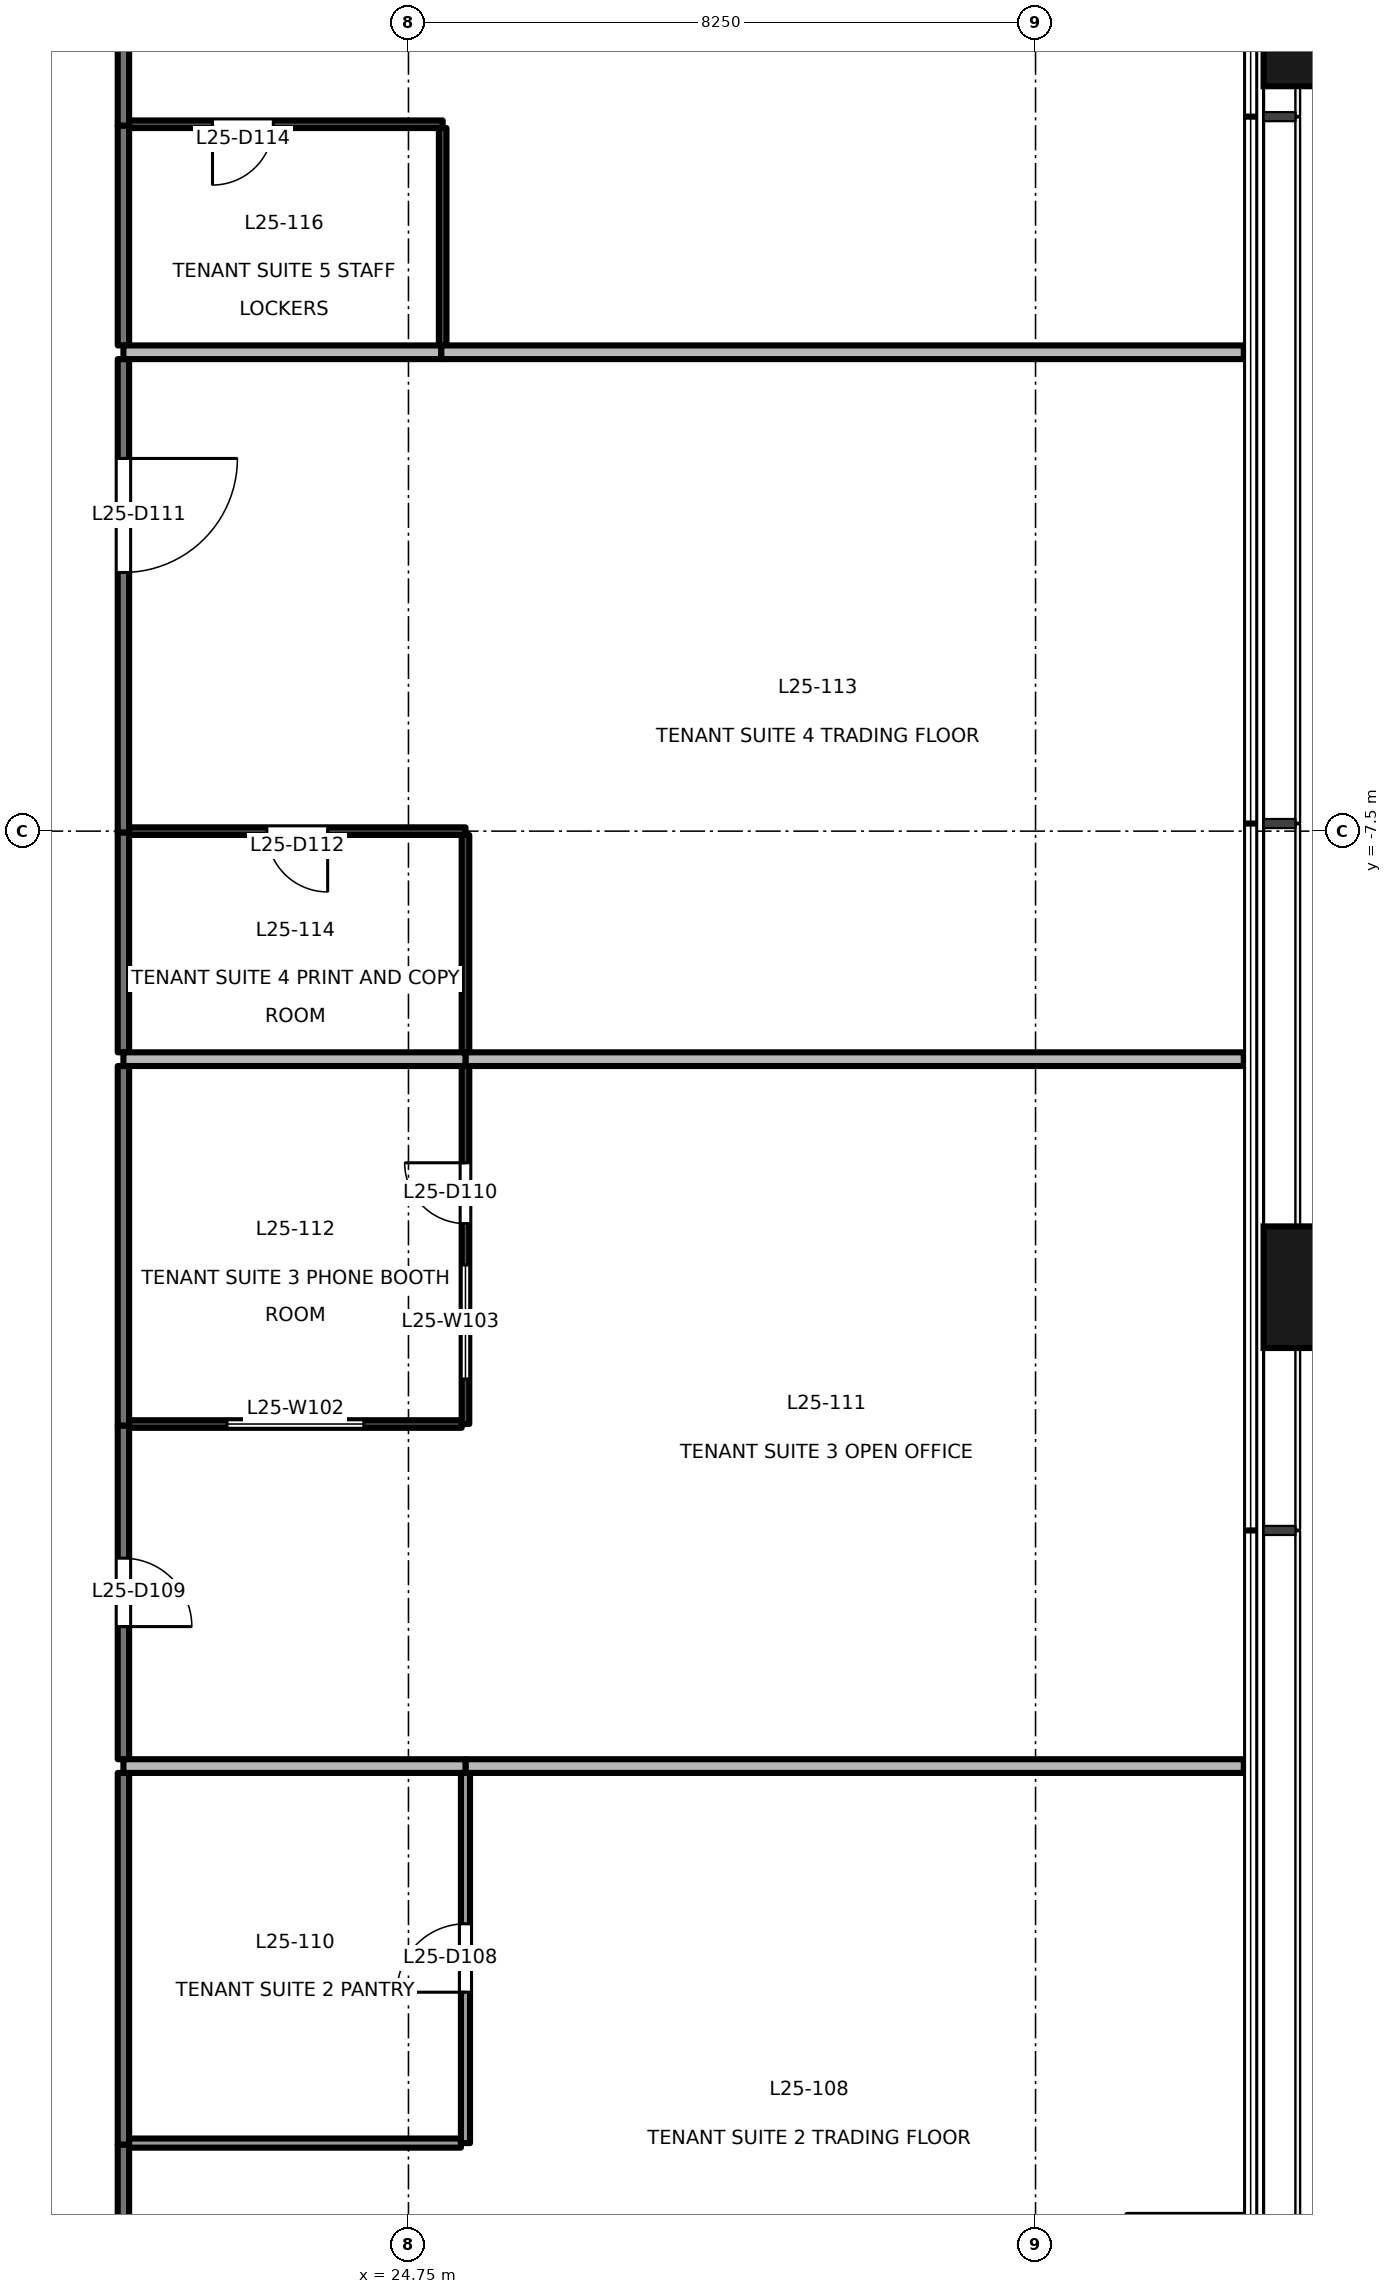
"""IFC4 building model, lengths in metres.
Left out: names, types, materials, properties, quantities, classifications, styles, units other than length and angle.
Written with IfcOpenShell. Run it as: python <this file> out.ifc"""

import sys

from ifc_helpers import new_model, si_unit, direction, frame, frame_2d, origin, origin_2d, place, context, subcontext, project, spatial, rectangle, extrude, element, fill, save


model = new_model("IFC4")
c1 = context("Model", 3, precision=1e-05, world=origin(), true_north=direction((0.0, 1.0)))
c2 = subcontext(c1, "Body", "Model", "MODEL_VIEW")
j1 = project(units=[si_unit("LENGTHUNIT", "METRE"), si_unit("PLANEANGLEUNIT", "RADIAN")], contexts=[c1])
p1 = place(None, origin())
s1 = spatial("IfcSite", under=j1, at=p1, CompositionType="ELEMENT")
p2 = place(p1, origin())
s2 = spatial("IfcBuilding", under=s1, at=p2, CompositionType="ELEMENT")
p3 = place(p2, frame((0.0, 0.0, 111.7)))
s3 = spatial("IfcBuildingStorey", under=s2, at=p3, CompositionType="ELEMENT", Elevation=111.7)
for number, where, z_axis, x_axis in (
    (1, (36.9, -13.5, -0.2), (0.0, 0.0, 1.0), (0.0, 1.0, 0.0)),
    (2, (36.9, 3.1, -0.2), (0.0, 0.0, 1.0), (0.0, 1.0, 0.0)),
):
    element("IfcColumn", number, at=place(p3, frame(where, z_axis=z_axis, x_axis=x_axis)), inside=s3, PredefinedType="COLUMN", context=c2, shape_type="SweptSolid", body=[
        extrude(rectangle(XDim=1.6, YDim=1.8, at=origin_2d()), origin(), (0.0, 0.0, 1.0), 4.0),
    ])
p4 = place(p3, frame((21.0, -24.78, 0.0), z_axis=(0.0, 0.0, 1.0), x_axis=(0.0, -1.0, 0.0)))
e3 = element("IfcWall", 3, at=p4, inside=s3, PredefinedType="PARTITIONING", context=c2, shape_type="SweptSolid", body=[
    extrude(rectangle(XDim=3.9, YDim=0.15, at=frame_2d((1.95, 0.0))), origin(), (0.0, 0.0, 1.0), 3.8),
])
p5 = place(p4, frame((1.675, 0.0, 0.0)))
e4 = element("IfcOpeningElement", 4, at=p5, cuts=e3, PredefinedType="OPENING", context=c2, shape_type="SweptSolid", body=[
    extrude(rectangle(XDim=1.5, YDim=2.1, at=frame_2d((0.75, 1.05))), frame((0.0, 0.085, 0.0), z_axis=(0.0, -1.0, 0.0), x_axis=(1.0, 0.0, 0.0)), (0.0, 0.0, 1.0), 0.171),
])
p6 = place(p3, frame((21.0, -19.89, 0.0), z_axis=(0.0, 0.0, 1.0), x_axis=(0.0, -1.0, 0.0)))
e5 = element("IfcWall", 5, at=p6, inside=s3, PredefinedType="PARTITIONING", context=c2, shape_type="SweptSolid", body=[
    extrude(rectangle(XDim=4.89, YDim=0.15, at=frame_2d((2.445, 0.0))), origin(), (0.0, 0.0, 1.0), 3.8),
])
p7 = place(p3, frame((21.0, -15.32, 0.0), z_axis=(0.0, 0.0, 1.0), x_axis=(0.0, -1.0, 0.0)))
e6 = element("IfcWall", 6, at=p7, inside=s3, PredefinedType="PARTITIONING", context=c2, shape_type="SweptSolid", body=[
    extrude(rectangle(XDim=4.39, YDim=0.15, at=frame_2d((2.195, 0.0))), origin(), (0.0, 0.0, 1.0), 3.8),
])
p8 = place(p7, frame((1.745, 0.0, 0.0)))
e7 = element("IfcOpeningElement", 7, at=p8, cuts=e6, PredefinedType="OPENING", context=c2, shape_type="SweptSolid", body=[
    extrude(rectangle(XDim=0.9, YDim=2.1, at=frame_2d((0.45, 1.05))), frame((0.0, 0.085, 0.0), z_axis=(0.0, -1.0, 0.0), x_axis=(1.0, 0.0, 0.0)), (0.0, 0.0, 1.0), 0.171),
])
p9 = place(p3, frame((21.0, -10.59, 0.0), z_axis=(0.0, 0.0, 1.0), x_axis=(0.0, -1.0, 0.0)))
e8 = element("IfcWall", 8, at=p9, inside=s3, PredefinedType="PARTITIONING", context=c2, shape_type="SweptSolid", body=[
    extrude(rectangle(XDim=4.73, YDim=0.15, at=frame_2d((2.365, 0.0))), origin(), (0.0, 0.0, 1.0), 2.9),
])
p10 = place(p3, frame((21.0, -1.29, 0.0), z_axis=(0.0, 0.0, 1.0), x_axis=(0.0, -1.0, 0.0)))
e9 = element("IfcWall", 9, at=p10, inside=s3, PredefinedType="PARTITIONING", context=c2, shape_type="SweptSolid", body=[
    extrude(rectangle(XDim=6.23, YDim=0.15, at=frame_2d((3.115, 0.0))), origin(), (0.0, 0.0, 1.0), 2.9),
])
p11 = place(p10, frame((1.307, 0.0, 0.0)))
e10 = element("IfcOpeningElement", 10, at=p11, cuts=e9, PredefinedType="OPENING", context=c2, shape_type="SweptSolid", body=[
    extrude(rectangle(XDim=1.5, YDim=2.1, at=frame_2d((0.75, 1.05))), frame((0.0, 0.085, 0.0), z_axis=(0.0, -1.0, 0.0), x_axis=(1.0, 0.0, 0.0)), (0.0, 0.0, 1.0), 0.171),
])
p12 = place(p3, frame((21.0, -7.52, 0.0), z_axis=(0.0, 0.0, 1.0), x_axis=(0.0, -1.0, 0.0)))
e11 = element("IfcWall", 11, at=p12, inside=s3, PredefinedType="PARTITIONING", context=c2, shape_type="SweptSolid", body=[
    extrude(rectangle(XDim=2.89, YDim=0.15, at=frame_2d((1.445, 0.0))), origin(), (0.0, 0.0, 1.0), 2.9),
])
p13 = place(p3, frame((21.0, 6.32, 0.0), z_axis=(0.0, 0.0, 1.0), x_axis=(0.0, -1.0, 0.0)))
e12 = element("IfcWall", 12, at=p13, inside=s3, PredefinedType="PARTITIONING", context=c2, shape_type="SweptSolid", body=[
    extrude(rectangle(XDim=4.54, YDim=0.15, at=frame_2d((2.27, 0.0))), origin(), (0.0, 0.0, 1.0), 2.9),
])
p14 = place(p13, frame((1.52, 0.0, 0.0)))
e13 = element("IfcOpeningElement", 13, at=p14, cuts=e12, PredefinedType="OPENING", context=c2, shape_type="SweptSolid", body=[
    extrude(rectangle(XDim=1.5, YDim=2.1, at=frame_2d((0.75, 1.05))), frame((0.0, 0.085, 0.0), z_axis=(0.0, -1.0, 0.0), x_axis=(1.0, 0.0, 0.0)), (0.0, 0.0, 1.0), 0.171),
])
p15 = place(p3, frame((21.0, 1.78, 0.0), z_axis=(0.0, 0.0, 1.0), x_axis=(0.0, -1.0, 0.0)))
e14 = element("IfcWall", 14, at=p15, inside=s3, PredefinedType="PARTITIONING", context=c2, shape_type="SweptSolid", body=[
    extrude(rectangle(XDim=2.89, YDim=0.15, at=frame_2d((1.445, 0.0))), origin(), (0.0, 0.0, 1.0), 2.9),
])
p16 = place(p3, frame((21.075, -24.76, 0.0), z_axis=(0.0, 0.0, 1.0), x_axis=(1.0, 0.0, 0.0)))
e15 = element("IfcWall", 15, at=p16, inside=s3, PredefinedType="PARTITIONING", context=c2, shape_type="SweptSolid", body=[
    extrude(rectangle(XDim=4.365, YDim=0.12, at=frame_2d((2.183, 0.0))), origin(), (0.0, 0.0, 1.0), 3.8),
])
p17 = place(p3, frame((25.5, -24.76, 0.0), z_axis=(0.0, 0.0, 1.0), x_axis=(0.0, 1.0, 0.0)))
e16 = element("IfcWall", 16, at=p17, inside=s3, PredefinedType="PARTITIONING", context=c2, shape_type="SweptSolid", body=[
    extrude(rectangle(XDim=4.87, YDim=0.12, at=frame_2d((2.435, 0.0))), origin(), (0.0, 0.0, 1.0), 3.8),
])
p18 = place(p17, frame((1.985, 0.0, 0.0)))
e17 = element("IfcOpeningElement", 17, at=p18, cuts=e16, PredefinedType="OPENING", context=c2, shape_type="SweptSolid", body=[
    extrude(rectangle(XDim=0.9, YDim=2.1, at=frame_2d((0.45, 1.05))), frame((0.0, 0.071, 0.0), z_axis=(0.0, -1.0, 0.0), x_axis=(1.0, 0.0, 0.0)), (0.0, 0.0, 1.0), 0.141),
])
p19 = place(p3, frame((25.5, -19.8, 0.0), z_axis=(0.0, 0.0, 1.0), x_axis=(1.0, 0.0, 0.0)))
e18 = element("IfcWall", 18, at=p19, inside=s3, PredefinedType="PARTITIONING", context=c2, shape_type="SweptSolid", body=[
    extrude(rectangle(XDim=10.24, YDim=0.18, at=frame_2d((5.12, 0.0))), origin(), (0.0, 0.0, 1.0), 3.8),
])
p20 = place(p3, frame((21.0, -19.8, 0.0), z_axis=(0.0, 0.0, 1.0), x_axis=(1.0, 0.0, 0.0)))
e19 = element("IfcWall", 19, at=p20, inside=s3, PredefinedType="PARTITIONING", context=c2, shape_type="SweptSolid", body=[
    extrude(rectangle(XDim=4.5, YDim=0.18, at=frame_2d((2.25, 0.0))), origin(), (0.0, 0.0, 1.0), 3.8),
])
p21 = place(p3, frame((21.075, -15.3, 0.0), z_axis=(0.0, 0.0, 1.0), x_axis=(1.0, 0.0, 0.0)))
e20 = element("IfcWall", 20, at=p21, inside=s3, PredefinedType="PARTITIONING", context=c2, shape_type="SweptSolid", body=[
    extrude(rectangle(XDim=4.375, YDim=0.1, at=frame_2d((2.188, 0.0))), origin(), (0.0, 0.0, 1.0), 3.8),
])
p22 = place(p21, frame((1.288, 0.0, 0.9)))
e21 = element("IfcOpeningElement", 21, at=p22, cuts=e20, PredefinedType="OPENING", context=c2, shape_type="SweptSolid", body=[
    extrude(rectangle(XDim=1.8, YDim=1.2, at=frame_2d((0.9, 0.6))), frame((0.0, 0.061, 0.0), z_axis=(0.0, -1.0, 0.0), x_axis=(1.0, 0.0, 0.0)), (0.0, 0.0, 1.0), 0.121),
])
p23 = place(p3, frame((25.5, -15.3, 0.0), z_axis=(0.0, 0.0, 1.0), x_axis=(0.0, 1.0, 0.0)))
e22 = element("IfcWall", 22, at=p23, inside=s3, PredefinedType="PARTITIONING", context=c2, shape_type="SweptSolid", body=[
    extrude(rectangle(XDim=4.71, YDim=0.1, at=frame_2d((2.355, 0.0))), origin(), (0.0, 0.0, 1.0), 2.9),
])
p24 = place(p23, frame((2.637, 0.0, 0.0)))
e23 = element("IfcOpeningElement", 23, at=p24, cuts=e22, PredefinedType="OPENING", context=c2, shape_type="SweptSolid", body=[
    extrude(rectangle(XDim=0.8, YDim=2.1, at=frame_2d((0.4, 1.05))), frame((0.0, 0.061, 0.0), z_axis=(0.0, -1.0, 0.0), x_axis=(1.0, 0.0, 0.0)), (0.0, 0.0, 1.0), 0.121),
])
p25 = place(p23, frame((0.593, 0.0, 0.9)))
e24 = element("IfcOpeningElement", 24, at=p25, cuts=e22, PredefinedType="OPENING", context=c2, shape_type="SweptSolid", body=[
    extrude(rectangle(XDim=1.5, YDim=1.2, at=frame_2d((0.75, 0.6))), frame((0.0, 0.061, 0.0), z_axis=(0.0, -1.0, 0.0), x_axis=(1.0, 0.0, 0.0)), (0.0, 0.0, 1.0), 0.121),
])
p26 = place(p3, frame((25.5, -10.5, 0.0), z_axis=(0.0, 0.0, 1.0), x_axis=(1.0, 0.0, 0.0)))
e25 = element("IfcWall", 25, at=p26, inside=s3, PredefinedType="PARTITIONING", context=c2, shape_type="SweptSolid", body=[
    extrude(rectangle(XDim=10.24, YDim=0.18, at=frame_2d((5.12, 0.0))), origin(), (0.0, 0.0, 1.0), 3.8),
])
p27 = place(p3, frame((21.0, -10.5, 0.0), z_axis=(0.0, 0.0, 1.0), x_axis=(1.0, 0.0, 0.0)))
e26 = element("IfcWall", 26, at=p27, inside=s3, PredefinedType="PARTITIONING", context=c2, shape_type="SweptSolid", body=[
    extrude(rectangle(XDim=4.5, YDim=0.18, at=frame_2d((2.25, 0.0))), origin(), (0.0, 0.0, 1.0), 3.8),
])
p28 = place(p3, frame((25.5, -7.5, 0.0), z_axis=(0.0, 0.0, 1.0), x_axis=(-1.0, 0.0, 0.0)))
e27 = element("IfcWall", 27, at=p28, inside=s3, PredefinedType="PARTITIONING", context=c2, shape_type="SweptSolid", body=[
    extrude(rectangle(XDim=4.425, YDim=0.1, at=frame_2d((2.212, 0.0))), origin(), (0.0, 0.0, 1.0), 3.8),
])
p29 = place(p28, frame((1.813, 0.0, 0.0)))
e28 = element("IfcOpeningElement", 28, at=p29, cuts=e27, PredefinedType="OPENING", context=c2, shape_type="SweptSolid", body=[
    extrude(rectangle(XDim=0.8, YDim=2.1, at=frame_2d((0.4, 1.05))), frame((0.0, 0.061, 0.0), z_axis=(0.0, -1.0, 0.0), x_axis=(1.0, 0.0, 0.0)), (0.0, 0.0, 1.0), 0.121),
])
p30 = place(p3, frame((25.5, -10.41, 0.0), z_axis=(0.0, 0.0, 1.0), x_axis=(0.0, 1.0, 0.0)))
e29 = element("IfcWall", 29, at=p30, inside=s3, PredefinedType="PARTITIONING", context=c2, shape_type="SweptSolid", body=[
    extrude(rectangle(XDim=2.86, YDim=0.1, at=frame_2d((1.43, 0.0))), origin(), (0.0, 0.0, 1.0), 2.9),
])
p31 = place(p3, frame((25.18, -1.2, 0.0), z_axis=(0.0, 0.0, 1.0), x_axis=(1.0, 0.0, 0.0)))
e30 = element("IfcWall", 30, at=p31, inside=s3, PredefinedType="PARTITIONING", context=c2, shape_type="SweptSolid", body=[
    extrude(rectangle(XDim=10.56, YDim=0.18, at=frame_2d((5.28, 0.0))), origin(), (0.0, 0.0, 1.0), 3.8),
])
p32 = place(p3, frame((21.0, -1.2, 0.0), z_axis=(0.0, 0.0, 1.0), x_axis=(1.0, 0.0, 0.0)))
e31 = element("IfcWall", 31, at=p32, inside=s3, PredefinedType="PARTITIONING", context=c2, shape_type="SweptSolid", body=[
    extrude(rectangle(XDim=4.18, YDim=0.18, at=frame_2d((2.09, 0.0))), origin(), (0.0, 0.0, 1.0), 3.8),
])
p33 = place(p3, frame((25.2, 1.8, 0.0), z_axis=(0.0, 0.0, 1.0), x_axis=(-1.0, 0.0, 0.0)))
e32 = element("IfcWall", 32, at=p33, inside=s3, PredefinedType="PARTITIONING", context=c2, shape_type="SweptSolid", body=[
    extrude(rectangle(XDim=4.125, YDim=0.1, at=frame_2d((2.062, 0.0))), origin(), (0.0, 0.0, 1.0), 3.8),
])
p34 = place(p33, frame((2.228, 0.0, 0.0)))
e33 = element("IfcOpeningElement", 33, at=p34, cuts=e32, PredefinedType="OPENING", context=c2, shape_type="SweptSolid", body=[
    extrude(rectangle(XDim=0.8, YDim=2.1, at=frame_2d((0.4, 1.05))), frame((0.0, 0.061, 0.0), z_axis=(0.0, -1.0, 0.0), x_axis=(1.0, 0.0, 0.0)), (0.0, 0.0, 1.0), 0.121),
])
p35 = place(p3, frame((25.2, -1.11, 0.0), z_axis=(0.0, 0.0, 1.0), x_axis=(0.0, 1.0, 0.0)))
e34 = element("IfcWall", 34, at=p35, inside=s3, PredefinedType="PARTITIONING", context=c2, shape_type="SweptSolid", body=[
    extrude(rectangle(XDim=2.86, YDim=0.1, at=frame_2d((1.43, 0.0))), origin(), (0.0, 0.0, 1.0), 2.9),
])
p36 = place(p18, origin())
e35 = element("IfcDoor", 35, at=p36, inside=s3, OperationType="SINGLE_SWING_LEFT", PredefinedType="DOOR", context=c2, shape_type="SweptSolid", body=[
    extrude(rectangle(XDim=0.9, YDim=2.1, at=frame_2d((0.45, 1.05))), frame((0.0, 0.025, 0.0), z_axis=(0.0, -1.0, 0.0), x_axis=(1.0, 0.0, 0.0)), (0.0, 0.0, 1.0), 0.05),
])
fill(e17, e35)
p37 = place(p8, origin())
e36 = element("IfcDoor", 36, at=p37, inside=s3, OperationType="SINGLE_SWING_RIGHT", PredefinedType="DOOR", context=c2, shape_type="SweptSolid", body=[
    extrude(rectangle(XDim=0.9, YDim=2.1, at=frame_2d((0.45, 1.05))), frame((0.0, 0.025, 0.0), z_axis=(0.0, -1.0, 0.0), x_axis=(1.0, 0.0, 0.0)), (0.0, 0.0, 1.0), 0.05),
])
fill(e7, e36)
p38 = place(p24, origin())
e37 = element("IfcDoor", 37, at=p38, inside=s3, OperationType="SINGLE_SWING_RIGHT", PredefinedType="DOOR", context=c2, shape_type="SweptSolid", body=[
    extrude(rectangle(XDim=0.8, YDim=2.1, at=frame_2d((0.4, 1.05))), frame((0.0, 0.025, 0.0), z_axis=(0.0, -1.0, 0.0), x_axis=(1.0, 0.0, 0.0)), (0.0, 0.0, 1.0), 0.05),
])
fill(e23, e37)
p39 = place(p11, origin())
e38 = element("IfcDoor", 38, at=p39, inside=s3, OperationType="DOUBLE_DOOR_SINGLE_SWING", PredefinedType="DOOR", context=c2, shape_type="SweptSolid", body=[
    extrude(rectangle(XDim=1.5, YDim=2.1, at=frame_2d((0.75, 1.05))), frame((0.0, 0.025, 0.0), z_axis=(0.0, -1.0, 0.0), x_axis=(1.0, 0.0, 0.0)), (0.0, 0.0, 1.0), 0.05),
])
fill(e10, e38)
p40 = place(p29, origin())
e39 = element("IfcDoor", 39, at=p40, inside=s3, OperationType="SINGLE_SWING_LEFT", PredefinedType="DOOR", context=c2, shape_type="SweptSolid", body=[
    extrude(rectangle(XDim=0.8, YDim=2.1, at=frame_2d((0.4, 1.05))), frame((0.0, 0.025, 0.0), z_axis=(0.0, -1.0, 0.0), x_axis=(1.0, 0.0, 0.0)), (0.0, 0.0, 1.0), 0.05),
])
fill(e28, e39)
p41 = place(p34, origin())
e40 = element("IfcDoor", 40, at=p41, inside=s3, OperationType="SINGLE_SWING_RIGHT", PredefinedType="DOOR", context=c2, shape_type="SweptSolid", body=[
    extrude(rectangle(XDim=0.8, YDim=2.1, at=frame_2d((0.4, 1.05))), frame((0.0, 0.025, 0.0), z_axis=(0.0, -1.0, 0.0), x_axis=(1.0, 0.0, 0.0)), (0.0, 0.0, 1.0), 0.05),
])
fill(e33, e40)
p42 = place(p22, origin())
e41 = element("IfcWindow", 41, at=p42, inside=s3, PartitioningType="SINGLE_PANEL", PredefinedType="WINDOW", context=c2, shape_type="SweptSolid", body=[
    extrude(rectangle(XDim=1.8, YDim=1.2, at=frame_2d((0.9, 0.6))), frame((0.0, 0.03, 0.0), z_axis=(0.0, -1.0, 0.0), x_axis=(1.0, 0.0, 0.0)), (0.0, 0.0, 1.0), 0.06),
])
fill(e21, e41)
p43 = place(p25, origin())
e42 = element("IfcWindow", 42, at=p43, inside=s3, PartitioningType="SINGLE_PANEL", PredefinedType="WINDOW", context=c2, shape_type="SweptSolid", body=[
    extrude(rectangle(XDim=1.5, YDim=1.2, at=frame_2d((0.75, 0.6))), frame((0.0, 0.03, 0.0), z_axis=(0.0, -1.0, 0.0), x_axis=(1.0, 0.0, 0.0)), (0.0, 0.0, 1.0), 0.06),
])
fill(e24, e42)
save(model, sys.argv[1])
